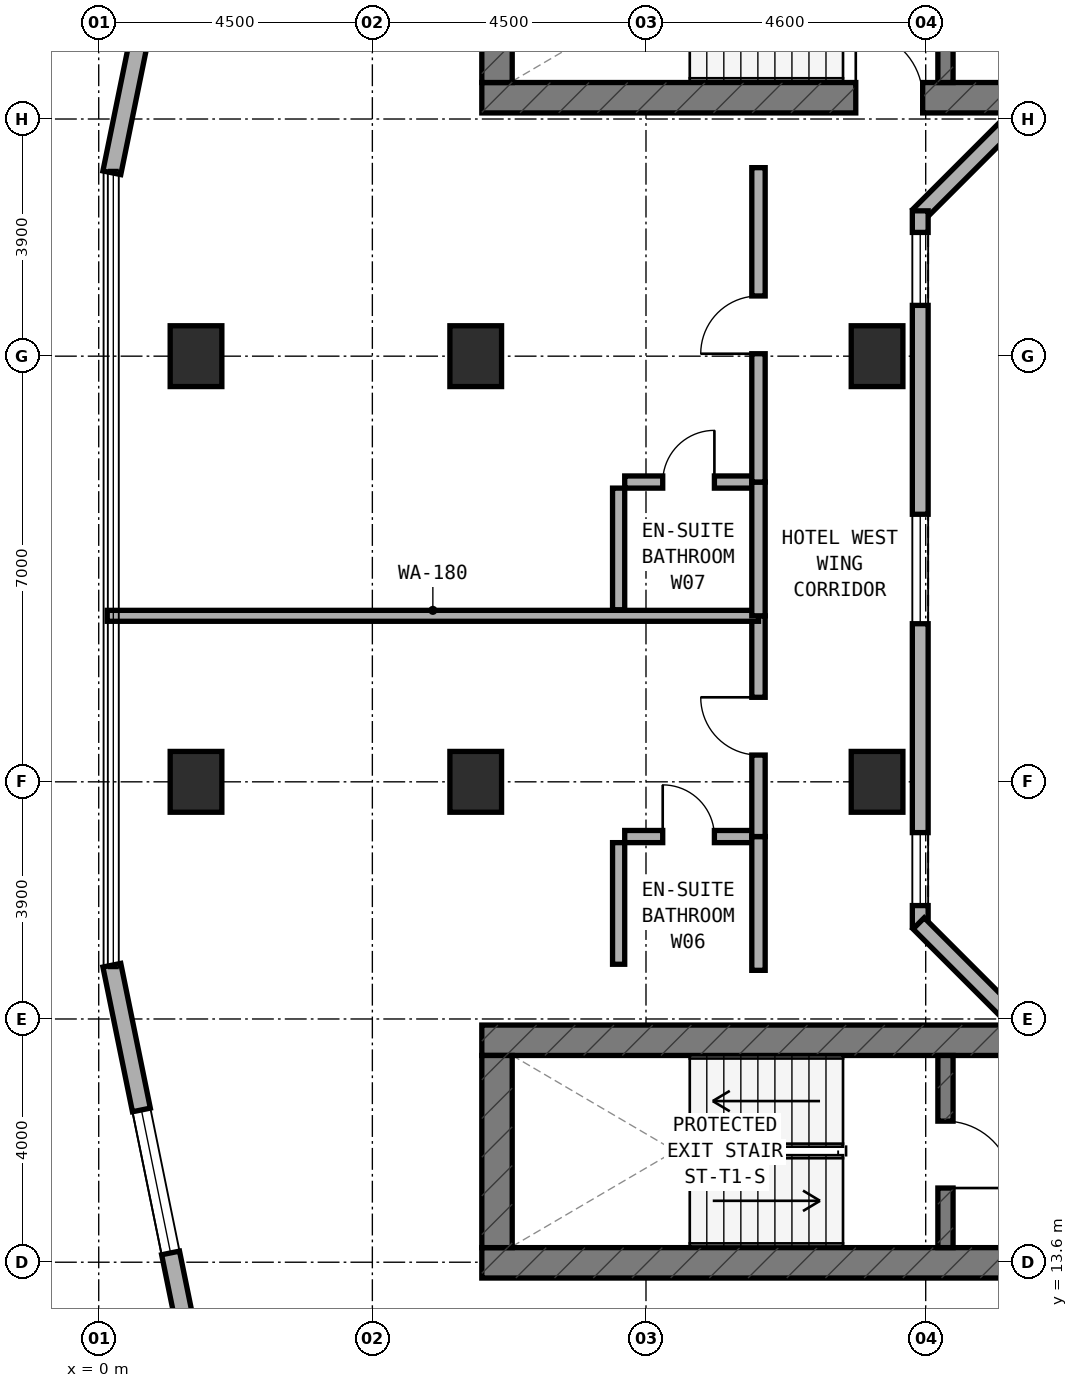
"""IFC4 building model, lengths in metres.
Left out: names, types, materials, properties, quantities, classifications, styles, units other than length and angle.
Written with IfcOpenShell. Run it as: python <this file> out.ifc"""

import sys

from ifc_helpers import new_model, si_unit, direction, frame, frame_2d, origin, origin_2d, place, context, subcontext, project, spatial, rectangle, extrude, element, fill, save


model = new_model("IFC4")
c1 = context("Model", 3, precision=1e-05, world=origin(), true_north=direction((0.0, 1.0)))
c2 = subcontext(c1, "Body", "Model", "MODEL_VIEW")
j1 = project(units=[si_unit("LENGTHUNIT", "METRE"), si_unit("PLANEANGLEUNIT", "RADIAN")], contexts=[c1])
p1 = place(None, origin())
s1 = spatial("IfcSite", under=j1, at=p1, CompositionType="ELEMENT")
p2 = place(p1, origin())
s2 = spatial("IfcBuilding", under=s1, at=p2, CompositionType="ELEMENT")
p3 = place(p2, frame((0.0, 0.0, 80.0)))
s3 = spatial("IfcBuildingStorey", under=s2, at=p3, CompositionType="ELEMENT", Elevation=80.0)
p4 = place(p3, frame((6.3, 32.75, 0.0), z_axis=(0.0, 0.0, 1.0), x_axis=(1.0, 0.0, 0.0)))
e1 = element("IfcWall", 1, at=p4, inside=s3, PredefinedType="SHEAR", context=c2, shape_type="SweptSolid", body=[
    extrude(rectangle(XDim=24.6, YDim=0.5, at=frame_2d((12.3, 0.0))), origin(), (0.0, 0.0, 1.0), 3.5),
])
p5 = place(p4, frame((6.15, 0.0, 0.0)))
e2 = element("IfcOpeningElement", 2, at=p5, cuts=e1, PredefinedType="OPENING", context=c2, shape_type="SweptSolid", body=[
    extrude(rectangle(XDim=1.1, YDim=2.15, at=frame_2d((0.55, 1.075))), frame((0.0, 0.26, 0.0), z_axis=(0.0, -1.0, 0.0), x_axis=(1.0, 0.0, 0.0)), (0.0, 0.0, 1.0), 0.52),
])
p6 = place(p3, frame((6.55, 33.0, 0.0), z_axis=(0.0, 0.0, 1.0), x_axis=(0.0, 1.0, 0.0)))
e3 = element("IfcWall", 3, at=p6, inside=s3, PredefinedType="SHEAR", context=c2, shape_type="SweptSolid", body=[
    extrude(rectangle(XDim=3.16, YDim=0.5, at=frame_2d((1.58, 0.0))), origin(), (0.0, 0.0, 1.0), 3.5),
])
p7 = place(p3, frame((13.925, 33.0, 0.0), z_axis=(0.0, 0.0, 1.0), x_axis=(0.0, 1.0, 0.0)))
e4 = element("IfcWall", 4, at=p7, inside=s3, PredefinedType="STANDARD", context=c2, shape_type="SweptSolid", body=[
    extrude(rectangle(XDim=3.16, YDim=0.25, at=frame_2d((1.58, 0.0))), origin(), (0.0, 0.0, 1.0), 3.22),
])
p8 = place(p7, frame((0.98, 0.0, 0.0)))
e5 = element("IfcOpeningElement", 5, at=p8, cuts=e4, PredefinedType="OPENING", context=c2, shape_type="SweptSolid", body=[
    extrude(rectangle(XDim=1.1, YDim=2.15, at=frame_2d((0.55, 1.075))), frame((0.0, 0.135, 0.0), z_axis=(0.0, -1.0, 0.0), x_axis=(1.0, 0.0, 0.0)), (0.0, 0.0, 1.0), 0.27),
])
p9 = place(p3, frame((6.3, 13.59, 0.0), z_axis=(0.0, 0.0, 1.0), x_axis=(1.0, 0.0, 0.0)))
e6 = element("IfcWall", 6, at=p9, inside=s3, PredefinedType="SHEAR", context=c2, shape_type="SweptSolid", body=[
    extrude(rectangle(XDim=24.6, YDim=0.5, at=frame_2d((12.3, 0.0))), origin(), (0.0, 0.0, 1.0), 3.5),
])
p10 = place(p9, frame((9.25, 0.0, 0.0)))
e7 = element("IfcOpeningElement", 7, at=p10, cuts=e6, PredefinedType="OPENING", context=c2, shape_type="SweptSolid", body=[
    extrude(rectangle(XDim=1.2, YDim=2.15, at=frame_2d((0.6, 1.075))), frame((0.0, 0.26, 0.0), z_axis=(0.0, -1.0, 0.0), x_axis=(1.0, 0.0, 0.0)), (0.0, 0.0, 1.0), 0.52),
])
p11 = place(p9, frame((17.04, 0.0, 0.0)))
e8 = element("IfcOpeningElement", 8, at=p11, cuts=e6, PredefinedType="OPENING", context=c2, shape_type="SweptSolid", body=[
    extrude(rectangle(XDim=0.85, YDim=2.1, at=frame_2d((0.425, 1.05))), frame((0.0, 0.26, 0.0), z_axis=(0.0, -1.0, 0.0), x_axis=(1.0, 0.0, 0.0)), (0.0, 0.0, 1.0), 0.52),
])
p12 = place(p3, frame((6.3, 17.25, 0.0), z_axis=(0.0, 0.0, 1.0), x_axis=(1.0, 0.0, 0.0)))
e9 = element("IfcWall", 9, at=p12, inside=s3, PredefinedType="SHEAR", context=c2, shape_type="SweptSolid", body=[
    extrude(rectangle(XDim=24.6, YDim=0.5, at=frame_2d((12.3, 0.0))), origin(), (0.0, 0.0, 1.0), 3.5),
])
p13 = place(p3, frame((6.55, 13.84, 0.0), z_axis=(0.0, 0.0, 1.0), x_axis=(0.0, 1.0, 0.0)))
e10 = element("IfcWall", 10, at=p13, inside=s3, PredefinedType="SHEAR", context=c2, shape_type="SweptSolid", body=[
    extrude(rectangle(XDim=3.16, YDim=0.5, at=frame_2d((1.58, 0.0))), origin(), (0.0, 0.0, 1.0), 3.5),
])
p14 = place(p3, frame((13.925, 13.84, 0.0), z_axis=(0.0, 0.0, 1.0), x_axis=(0.0, 1.0, 0.0)))
e11 = element("IfcWall", 11, at=p14, inside=s3, PredefinedType="STANDARD", context=c2, shape_type="SweptSolid", body=[
    extrude(rectangle(XDim=3.16, YDim=0.25, at=frame_2d((1.58, 0.0))), origin(), (0.0, 0.0, 1.0), 3.22),
])
p15 = place(p14, frame((0.98, 0.0, 0.0)))
e12 = element("IfcOpeningElement", 12, at=p15, cuts=e11, PredefinedType="OPENING", context=c2, shape_type="SweptSolid", body=[
    extrude(rectangle(XDim=1.1, YDim=2.15, at=frame_2d((0.55, 1.075))), frame((0.0, 0.135, 0.0), z_axis=(0.0, -1.0, 0.0), x_axis=(1.0, 0.0, 0.0)), (0.0, 0.0, 1.0), 0.27),
])
for number, where, z_axis, x_axis in (
    (13, (6.2, 21.5, 0.0), (0.0, 0.0, 1.0), (1.0, 0.0, 0.0)),
    (14, (6.2, 28.5, 0.0), (0.0, 0.0, 1.0), (1.0, 0.0, 0.0)),
    (15, (12.8, 21.5, 0.0), (0.0, 0.0, 1.0), (1.0, 0.0, 0.0)),
    (16, (12.8, 28.5, 0.0), (0.0, 0.0, 1.0), (1.0, 0.0, 0.0)),
    (17, (1.6, 21.5, 0.0), (0.0, 0.0, 1.0), (1.0, 0.0, 0.0)),
    (18, (1.6, 28.5, 0.0), (0.0, 0.0, 1.0), (1.0, 0.0, 0.0)),
):
    element("IfcColumn", number, at=place(p3, frame(where, z_axis=z_axis, x_axis=x_axis)), inside=s3, PredefinedType="COLUMN", context=c2, shape_type="SweptSolid", body=[
        extrude(rectangle(XDim=0.85, YDim=1.0, at=origin_2d()), origin(), (0.0, 0.0, 1.0), 3.5),
    ])
p16 = place(p3, frame((2.229, 41.378, 0.0), z_axis=(0.0, 0.0, 1.0), x_axis=(-0.199990901713, -0.979797754249, 0.0)))
e19 = element("IfcWall", 19, at=p16, inside=s3, PredefinedType="STANDARD", context=c2, shape_type="SweptSolid", body=[
    extrude(rectangle(XDim=10.065, YDim=0.3, at=frame_2d((5.033, 0.0))), origin(), (0.0, 0.0, 1.0), 3.22),
])
p17 = place(p16, frame((0.378, 0.0, 0.85)))
e20 = element("IfcOpeningElement", 20, at=p17, cuts=e19, PredefinedType="OPENING", context=c2, shape_type="SweptSolid", body=[
    extrude(rectangle(XDim=1.8, YDim=1.5, at=frame_2d((0.9, 0.75))), frame((0.0, 0.16, 0.0), z_axis=(0.0, -1.0, 0.0), x_axis=(1.0, 0.0, 0.0)), (0.0, 0.0, 1.0), 0.32),
])
p18 = place(p16, frame((5.236, 0.0, 0.8)))
e21 = element("IfcOpeningElement", 21, at=p18, cuts=e19, PredefinedType="OPENING", context=c2, shape_type="SweptSolid", body=[
    extrude(rectangle(XDim=2.4, YDim=1.6, at=frame_2d((1.2, 0.8))), frame((0.0, 0.16, 0.0), z_axis=(0.0, -1.0, 0.0), x_axis=(1.0, 0.0, 0.0)), (0.0, 0.0, 1.0), 0.32),
])
p19 = place(p3, frame((0.216, 18.484, 0.0), z_axis=(0.0, 0.0, 1.0), x_axis=(0.199990901713, -0.979797754249, 0.0)))
e22 = element("IfcWall", 22, at=p19, inside=s3, PredefinedType="STANDARD", context=c2, shape_type="SweptSolid", body=[
    extrude(rectangle(XDim=10.065, YDim=0.3, at=frame_2d((5.033, 0.0))), origin(), (0.0, 0.0, 1.0), 3.22),
])
p20 = place(p19, frame((2.429, 0.0, 0.8)))
e23 = element("IfcOpeningElement", 23, at=p20, cuts=e22, PredefinedType="OPENING", context=c2, shape_type="SweptSolid", body=[
    extrude(rectangle(XDim=2.4, YDim=1.6, at=frame_2d((1.2, 0.8))), frame((0.0, 0.16, 0.0), z_axis=(0.0, -1.0, 0.0), x_axis=(1.0, 0.0, 0.0)), (0.0, 0.0, 1.0), 0.32),
])
p21 = place(p19, frame((7.887, 0.0, 0.85)))
e24 = element("IfcOpeningElement", 24, at=p21, cuts=e22, PredefinedType="OPENING", context=c2, shape_type="SweptSolid", body=[
    extrude(rectangle(XDim=1.8, YDim=1.5, at=frame_2d((0.9, 0.75))), frame((0.0, 0.16, 0.0), z_axis=(0.0, -1.0, 0.0), x_axis=(1.0, 0.0, 0.0)), (0.0, 0.0, 1.0), 0.32),
])
p22 = place(p3, frame((15.318, 32.662, 0.0), z_axis=(0.0, 0.0, 1.0), x_axis=(-0.707106781187, -0.707106781187, 0.0)))
e25 = element("IfcWall", 25, at=p22, inside=s3, PredefinedType="STANDARD", context=c2, shape_type="SweptSolid", body=[
    extrude(rectangle(XDim=2.594, YDim=0.26, at=frame_2d((1.297, 0.0))), origin(), (0.0, 0.0, 1.0), 3.22),
])
p23 = place(p3, frame((13.51, 30.89, 0.0), z_axis=(0.0, 0.0, 1.0), x_axis=(0.0, -1.0, 0.0)))
e26 = element("IfcWall", 26, at=p23, inside=s3, PredefinedType="STANDARD", context=c2, shape_type="SweptSolid", body=[
    extrude(rectangle(XDim=11.78, YDim=0.26, at=frame_2d((5.89, 0.0))), origin(), (0.0, 0.0, 1.0), 3.22),
])
p24 = place(p23, frame((0.355, 0.0, 0.85)))
e27 = element("IfcOpeningElement", 27, at=p24, cuts=e26, PredefinedType="OPENING", context=c2, shape_type="SweptSolid", body=[
    extrude(rectangle(XDim=1.2, YDim=1.5, at=frame_2d((0.6, 0.75))), frame((0.0, 0.14, 0.0), z_axis=(0.0, -1.0, 0.0), x_axis=(1.0, 0.0, 0.0)), (0.0, 0.0, 1.0), 0.28),
])
p25 = place(p23, frame((4.99, 0.0, 0.85)))
e28 = element("IfcOpeningElement", 28, at=p25, cuts=e26, PredefinedType="OPENING", context=c2, shape_type="SweptSolid", body=[
    extrude(rectangle(XDim=1.8, YDim=1.5, at=frame_2d((0.9, 0.75))), frame((0.0, 0.14, 0.0), z_axis=(0.0, -1.0, 0.0), x_axis=(1.0, 0.0, 0.0)), (0.0, 0.0, 1.0), 0.28),
])
p26 = place(p23, frame((10.225, 0.0, 0.85)))
e29 = element("IfcOpeningElement", 29, at=p26, cuts=e26, PredefinedType="OPENING", context=c2, shape_type="SweptSolid", body=[
    extrude(rectangle(XDim=1.2, YDim=1.5, at=frame_2d((0.6, 0.75))), frame((0.0, 0.14, 0.0), z_axis=(0.0, -1.0, 0.0), x_axis=(1.0, 0.0, 0.0)), (0.0, 0.0, 1.0), 0.28),
])
p27 = place(p3, frame((13.484, 19.172, 0.0), z_axis=(0.0, 0.0, 1.0), x_axis=(0.707106781187, -0.707106781187, 0.0)))
e30 = element("IfcWall", 30, at=p27, inside=s3, PredefinedType="STANDARD", context=c2, shape_type="SweptSolid", body=[
    extrude(rectangle(XDim=2.594, YDim=0.26, at=frame_2d((1.297, 0.0))), origin(), (0.0, 0.0, 1.0), 3.22),
])
p28 = place(p3, frame((8.65, 20.6, 0.0), z_axis=(0.0, 0.0, 1.0), x_axis=(1.0, 0.0, 0.0)))
e31 = element("IfcWall", 31, at=p28, inside=s3, PredefinedType="PLUMBINGWALL", context=c2, shape_type="SweptSolid", body=[
    extrude(rectangle(XDim=2.1, YDim=0.2, at=frame_2d((1.05, 0.0))), origin(), (0.0, 0.0, 1.0), 3.22),
])
p29 = place(p28, frame((0.625, 0.0, 0.0)))
e32 = element("IfcOpeningElement", 32, at=p29, cuts=e31, PredefinedType="OPENING", context=c2, shape_type="SweptSolid", body=[
    extrude(rectangle(XDim=0.85, YDim=2.1, at=frame_2d((0.425, 1.05))), frame((0.0, 0.11, 0.0), z_axis=(0.0, -1.0, 0.0), x_axis=(1.0, 0.0, 0.0)), (0.0, 0.0, 1.0), 0.22),
])
p30 = place(p3, frame((8.55, 18.5, 0.0), z_axis=(0.0, 0.0, 1.0), x_axis=(0.0, 1.0, 0.0)))
e33 = element("IfcWall", 33, at=p30, inside=s3, PredefinedType="PLUMBINGWALL", context=c2, shape_type="SweptSolid", body=[
    extrude(rectangle(XDim=2.0, YDim=0.2, at=frame_2d((1.0, 0.0))), origin(), (0.0, 0.0, 1.0), 3.22),
])
p31 = place(p3, frame((10.85, 18.4, 0.0), z_axis=(0.0, 0.0, 1.0), x_axis=(0.0, 1.0, 0.0)))
e34 = element("IfcWall", 34, at=p31, inside=s3, PredefinedType="SOLIDWALL", context=c2, shape_type="SweptSolid", body=[
    extrude(rectangle(XDim=2.2, YDim=0.22, at=frame_2d((1.1, 0.0))), origin(), (0.0, 0.0, 1.0), 3.22),
])
p32 = place(p3, frame((10.85, 20.6, 0.0), z_axis=(0.0, 0.0, 1.0), x_axis=(0.0, 1.0, 0.0)))
e35 = element("IfcWall", 35, at=p32, inside=s3, PredefinedType="SOLIDWALL", context=c2, shape_type="SweptSolid", body=[
    extrude(rectangle(XDim=3.63, YDim=0.22, at=frame_2d((1.815, 0.0))), origin(), (0.0, 0.0, 1.0), 2.495),
])
p33 = place(p32, frame((1.34, 0.0, 0.0)))
e36 = element("IfcOpeningElement", 36, at=p33, cuts=e35, PredefinedType="OPENING", context=c2, shape_type="SweptSolid", body=[
    extrude(rectangle(XDim=0.95, YDim=2.1, at=frame_2d((0.475, 1.05))), frame((0.0, 0.12, 0.0), z_axis=(0.0, -1.0, 0.0), x_axis=(1.0, 0.0, 0.0)), (0.0, 0.0, 1.0), 0.24),
])
p34 = place(p3, frame((0.14, 24.23, 0.0), z_axis=(0.0, 0.0, 1.0), x_axis=(1.0, 0.0, 0.0)))
e37 = element("IfcWall", 37, at=p34, inside=s3, PredefinedType="SOLIDWALL", context=c2, shape_type="SweptSolid", body=[
    extrude(rectangle(XDim=10.71, YDim=0.18, at=frame_2d((5.355, 0.0))), origin(), (0.0, 0.0, 1.0), 2.745),
])
p35 = place(p3, frame((8.65, 26.43, 0.0), z_axis=(0.0, 0.0, 1.0), x_axis=(1.0, 0.0, 0.0)))
e38 = element("IfcWall", 38, at=p35, inside=s3, PredefinedType="PLUMBINGWALL", context=c2, shape_type="SweptSolid", body=[
    extrude(rectangle(XDim=2.1, YDim=0.2, at=frame_2d((1.05, 0.0))), origin(), (0.0, 0.0, 1.0), 3.22),
])
p36 = place(p35, frame((0.625, 0.0, 0.0)))
e39 = element("IfcOpeningElement", 39, at=p36, cuts=e38, PredefinedType="OPENING", context=c2, shape_type="SweptSolid", body=[
    extrude(rectangle(XDim=0.85, YDim=2.1, at=frame_2d((0.425, 1.05))), frame((0.0, 0.11, 0.0), z_axis=(0.0, -1.0, 0.0), x_axis=(1.0, 0.0, 0.0)), (0.0, 0.0, 1.0), 0.22),
])
p37 = place(p3, frame((8.55, 24.33, 0.0), z_axis=(0.0, 0.0, 1.0), x_axis=(0.0, 1.0, 0.0)))
e40 = element("IfcWall", 40, at=p37, inside=s3, PredefinedType="PLUMBINGWALL", context=c2, shape_type="SweptSolid", body=[
    extrude(rectangle(XDim=2.0, YDim=0.2, at=frame_2d((1.0, 0.0))), origin(), (0.0, 0.0, 1.0), 3.22),
])
p38 = place(p3, frame((10.85, 24.23, 0.0), z_axis=(0.0, 0.0, 1.0), x_axis=(0.0, 1.0, 0.0)))
e41 = element("IfcWall", 41, at=p38, inside=s3, PredefinedType="SOLIDWALL", context=c2, shape_type="SweptSolid", body=[
    extrude(rectangle(XDim=2.2, YDim=0.22, at=frame_2d((1.1, 0.0))), origin(), (0.0, 0.0, 1.0), 3.22),
])
p39 = place(p3, frame((10.85, 26.43, 0.0), z_axis=(0.0, 0.0, 1.0), x_axis=(0.0, 1.0, 0.0)))
e42 = element("IfcWall", 42, at=p39, inside=s3, PredefinedType="SOLIDWALL", context=c2, shape_type="SweptSolid", body=[
    extrude(rectangle(XDim=5.17, YDim=0.22, at=frame_2d((2.585, 0.0))), origin(), (0.0, 0.0, 1.0), 2.495),
])
p40 = place(p39, frame((2.11, 0.0, 0.0)))
e43 = element("IfcOpeningElement", 43, at=p40, cuts=e42, PredefinedType="OPENING", context=c2, shape_type="SweptSolid", body=[
    extrude(rectangle(XDim=0.95, YDim=2.1, at=frame_2d((0.475, 1.05))), frame((0.0, 0.12, 0.0), z_axis=(0.0, -1.0, 0.0), x_axis=(1.0, 0.0, 0.0)), (0.0, 0.0, 1.0), 0.24),
])
p41 = place(p20, origin())
e44 = element("IfcWindow", 44, at=p41, inside=s3, PartitioningType="SINGLE_PANEL", PredefinedType="WINDOW", context=c2, shape_type="SweptSolid", body=[
    extrude(rectangle(XDim=2.4, YDim=1.6, at=frame_2d((1.2, 0.8))), frame((0.0, 0.03, 0.0), z_axis=(0.0, -1.0, 0.0), x_axis=(1.0, 0.0, 0.0)), (0.0, 0.0, 1.0), 0.06),
])
fill(e23, e44)
p42 = place(p24, origin())
e45 = element("IfcWindow", 45, at=p42, inside=s3, PartitioningType="SINGLE_PANEL", PredefinedType="WINDOW", context=c2, shape_type="SweptSolid", body=[
    extrude(rectangle(XDim=1.2, YDim=1.5, at=frame_2d((0.6, 0.75))), frame((0.0, 0.03, 0.0), z_axis=(0.0, -1.0, 0.0), x_axis=(1.0, 0.0, 0.0)), (0.0, 0.0, 1.0), 0.06),
])
fill(e27, e45)
p43 = place(p25, origin())
e46 = element("IfcWindow", 46, at=p43, inside=s3, PartitioningType="SINGLE_PANEL", PredefinedType="WINDOW", context=c2, shape_type="SweptSolid", body=[
    extrude(rectangle(XDim=1.8, YDim=1.5, at=frame_2d((0.9, 0.75))), frame((0.0, 0.03, 0.0), z_axis=(0.0, -1.0, 0.0), x_axis=(1.0, 0.0, 0.0)), (0.0, 0.0, 1.0), 0.06),
])
fill(e28, e46)
p44 = place(p26, origin())
e47 = element("IfcWindow", 47, at=p44, inside=s3, PartitioningType="SINGLE_PANEL", PredefinedType="WINDOW", context=c2, shape_type="SweptSolid", body=[
    extrude(rectangle(XDim=1.2, YDim=1.5, at=frame_2d((0.6, 0.75))), frame((0.0, 0.03, 0.0), z_axis=(0.0, -1.0, 0.0), x_axis=(1.0, 0.0, 0.0)), (0.0, 0.0, 1.0), 0.06),
])
fill(e29, e47)
p45 = place(p15, frame((1.1, 0.0, 0.0), z_axis=(0.0, 0.0, 1.0), x_axis=(-1.0, 0.0, 0.0)))
e48 = element("IfcDoor", 48, at=p45, inside=s3, OperationType="SINGLE_SWING_RIGHT", PredefinedType="DOOR", context=c2, shape_type="SweptSolid", body=[
    extrude(rectangle(XDim=1.1, YDim=2.15, at=frame_2d((0.55, 1.075))), frame((0.0, 0.025, 0.0), z_axis=(0.0, -1.0, 0.0), x_axis=(1.0, 0.0, 0.0)), (0.0, 0.0, 1.0), 0.05),
])
fill(e12, e48)
p46 = place(p5, origin())
e49 = element("IfcDoor", 49, at=p46, inside=s3, OperationType="SINGLE_SWING_LEFT", PredefinedType="DOOR", context=c2, shape_type="SweptSolid", body=[
    extrude(rectangle(XDim=1.1, YDim=2.15, at=frame_2d((0.55, 1.075))), frame((0.0, 0.025, 0.0), z_axis=(0.0, -1.0, 0.0), x_axis=(1.0, 0.0, 0.0)), (0.0, 0.0, 1.0), 0.05),
])
fill(e2, e49)
p47 = place(p29, origin())
e50 = element("IfcDoor", 50, at=p47, inside=s3, OperationType="SINGLE_SWING_LEFT", PredefinedType="DOOR", context=c2, shape_type="SweptSolid", body=[
    extrude(rectangle(XDim=0.85, YDim=2.1, at=frame_2d((0.425, 1.05))), frame((0.0, 0.025, 0.0), z_axis=(0.0, -1.0, 0.0), x_axis=(1.0, 0.0, 0.0)), (0.0, 0.0, 1.0), 0.05),
])
fill(e32, e50)
p48 = place(p33, origin())
e51 = element("IfcDoor", 51, at=p48, inside=s3, OperationType="SINGLE_SWING_RIGHT", PredefinedType="DOOR", context=c2, shape_type="SweptSolid", body=[
    extrude(rectangle(XDim=0.95, YDim=2.1, at=frame_2d((0.475, 1.05))), frame((0.0, 0.025, 0.0), z_axis=(0.0, -1.0, 0.0), x_axis=(1.0, 0.0, 0.0)), (0.0, 0.0, 1.0), 0.05),
])
fill(e36, e51)
p49 = place(p36, origin())
e52 = element("IfcDoor", 52, at=p49, inside=s3, OperationType="SINGLE_SWING_RIGHT", PredefinedType="DOOR", context=c2, shape_type="SweptSolid", body=[
    extrude(rectangle(XDim=0.85, YDim=2.1, at=frame_2d((0.425, 1.05))), frame((0.0, 0.025, 0.0), z_axis=(0.0, -1.0, 0.0), x_axis=(1.0, 0.0, 0.0)), (0.0, 0.0, 1.0), 0.05),
])
fill(e39, e52)
p50 = place(p40, origin())
e53 = element("IfcDoor", 53, at=p50, inside=s3, OperationType="SINGLE_SWING_LEFT", PredefinedType="DOOR", context=c2, shape_type="SweptSolid", body=[
    extrude(rectangle(XDim=0.95, YDim=2.1, at=frame_2d((0.475, 1.05))), frame((0.0, 0.025, 0.0), z_axis=(0.0, -1.0, 0.0), x_axis=(1.0, 0.0, 0.0)), (0.0, 0.0, 1.0), 0.05),
])
fill(e43, e53)
save(model, sys.argv[1])
